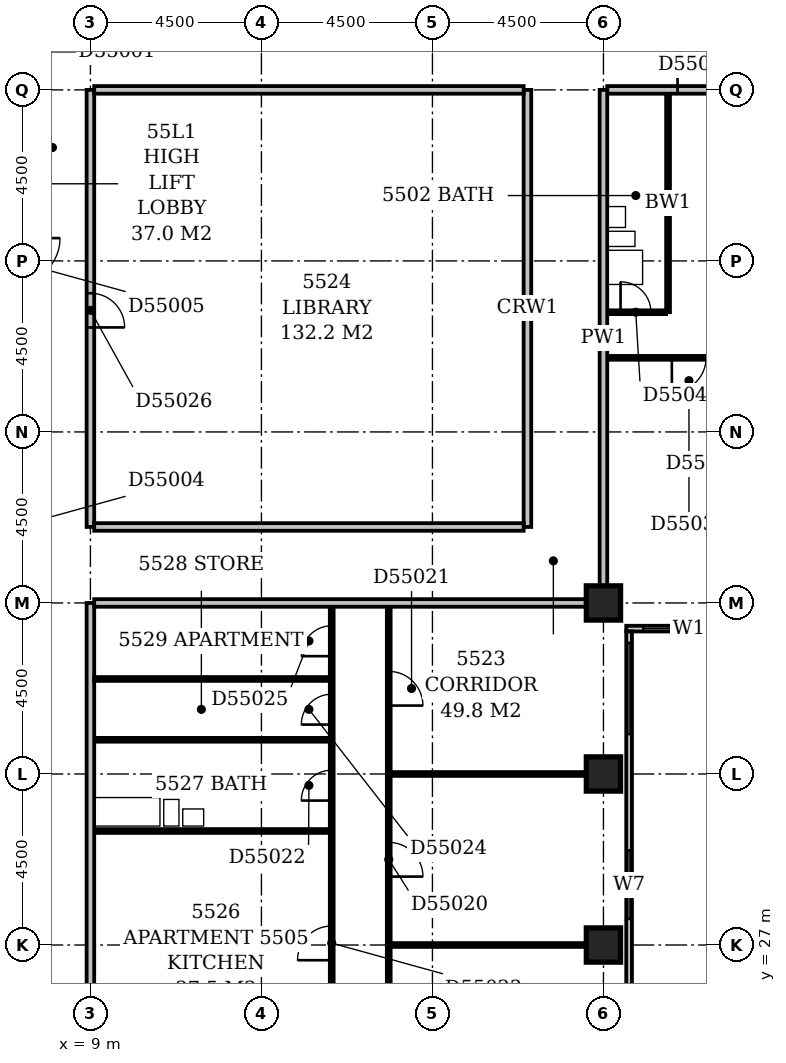
"""IFC4 building model, lengths in metres.
Left out: names, types, materials, properties, quantities, classifications, styles, units other than length and angle.
Written with IfcOpenShell. Run it as: python <this file> out.ifc"""

import sys

from ifc_helpers import new_model, si_unit, direction, frame, frame_2d, origin, origin_2d, place, context, subcontext, project, spatial, rectangle, extrude, element, fill, save


model = new_model("IFC4")
c1 = context("Model", 3, precision=1e-05, world=origin(), true_north=direction((0.0, 1.0)))
c2 = subcontext(c1, "Body", "Model", "MODEL_VIEW")
j1 = project(units=[si_unit("LENGTHUNIT", "METRE"), si_unit("PLANEANGLEUNIT", "RADIAN")], contexts=[c1])
p1 = place(None, origin())
s1 = spatial("IfcSite", under=j1, at=p1, CompositionType="ELEMENT")
p2 = place(p1, origin())
s2 = spatial("IfcBuilding", under=s1, at=p2, CompositionType="ELEMENT")
p3 = place(p2, frame((0.0, 0.0, 215.0)))
s3 = spatial("IfcBuildingStorey", under=s2, at=p3, CompositionType="ELEMENT", Elevation=215.0)
for number, where, z_axis, x_axis in (
    (1, (22.5, 27.0, -0.3), (0.0, 0.0, 1.0), (1.0, 0.0, 0.0)),
    (2, (22.5, 31.5, -0.3), (0.0, 0.0, 1.0), (1.0, 0.0, 0.0)),
    (3, (22.5, 36.0, -0.3), (0.0, 0.0, 1.0), (1.0, 0.0, 0.0)),
):
    element("IfcColumn", number, at=place(p3, frame(where, z_axis=z_axis, x_axis=x_axis)), inside=s3, PredefinedType="COLUMN", context=c2, shape_type="SweptSolid", body=[
        extrude(rectangle(XDim=0.9, YDim=0.9, at=origin_2d()), origin(), (0.0, 0.0, 1.0), 3.6),
    ])
p4 = place(p3, frame((23.175, 17.4, 0.0), z_axis=(0.0, 0.0, 1.0), x_axis=(0.0, 1.0, 0.0)))
e4 = element("IfcWall", 4, at=p4, inside=s3, PredefinedType="STANDARD", context=c2, shape_type="SweptSolid", body=[
    extrude(rectangle(XDim=17.85, YDim=0.15, at=frame_2d((8.925, 0.0))), origin(), (0.0, 0.0, 1.0), 2.7),
])
p5 = place(p4, frame((1.65, 0.0, 0.6)))
e5 = element("IfcOpeningElement", 5, at=p5, cuts=e4, PredefinedType="OPENING", context=c2, shape_type="SweptSolid", body=[
    extrude(rectangle(XDim=2.4, YDim=1.8, at=frame_2d((1.2, 0.9))), frame((0.0, 0.087, 0.0), z_axis=(0.0, -1.0, 0.0), x_axis=(1.0, 0.0, 0.0)), (0.0, 0.0, 1.0), 0.174),
])
p6 = place(p4, frame((6.15, 0.0, 0.6)))
e6 = element("IfcOpeningElement", 6, at=p6, cuts=e4, PredefinedType="OPENING", context=c2, shape_type="SweptSolid", body=[
    extrude(rectangle(XDim=2.4, YDim=1.8, at=frame_2d((1.2, 0.9))), frame((0.0, 0.087, 0.0), z_axis=(0.0, -1.0, 0.0), x_axis=(1.0, 0.0, 0.0)), (0.0, 0.0, 1.0), 0.174),
])
p7 = place(p4, frame((10.288, 0.0, 0.6)))
e7 = element("IfcOpeningElement", 7, at=p7, cuts=e4, PredefinedType="OPENING", context=c2, shape_type="SweptSolid", body=[
    extrude(rectangle(XDim=1.8, YDim=1.8, at=frame_2d((0.9, 0.9))), frame((0.0, 0.087, 0.0), z_axis=(0.0, -1.0, 0.0), x_axis=(1.0, 0.0, 0.0)), (0.0, 0.0, 1.0), 0.174),
])
p8 = place(p4, frame((15.15, 0.0, 0.6)))
e8 = element("IfcOpeningElement", 8, at=p8, cuts=e4, PredefinedType="OPENING", context=c2, shape_type="SweptSolid", body=[
    extrude(rectangle(XDim=2.4, YDim=1.8, at=frame_2d((1.2, 0.9))), frame((0.0, 0.087, 0.0), z_axis=(0.0, -1.0, 0.0), x_axis=(1.0, 0.0, 0.0)), (0.0, 0.0, 1.0), 0.174),
])
p9 = place(p3, frame((23.1, 35.325, 0.0), z_axis=(0.0, 0.0, 1.0), x_axis=(1.0, 0.0, 0.0)))
e9 = element("IfcWall", 9, at=p9, inside=s3, PredefinedType="STANDARD", context=c2, shape_type="SweptSolid", body=[
    extrude(rectangle(XDim=27.15, YDim=0.15, at=frame_2d((13.575, 0.0))), origin(), (0.0, 0.0, 1.0), 2.7),
])
p10 = place(p9, frame((0.45, 0.0, 0.6)))
e10 = element("IfcOpeningElement", 10, at=p10, cuts=e9, PredefinedType="OPENING", context=c2, shape_type="SweptSolid", body=[
    extrude(rectangle(XDim=2.4, YDim=1.8, at=frame_2d((1.2, 0.9))), frame((0.0, 0.087, 0.0), z_axis=(0.0, -1.0, 0.0), x_axis=(1.0, 0.0, 0.0)), (0.0, 0.0, 1.0), 0.174),
])
p11 = place(p9, frame((4.95, 0.0, 0.6)))
e11 = element("IfcOpeningElement", 11, at=p11, cuts=e9, PredefinedType="OPENING", context=c2, shape_type="SweptSolid", body=[
    extrude(rectangle(XDim=2.4, YDim=1.8, at=frame_2d((1.2, 0.9))), frame((0.0, 0.087, 0.0), z_axis=(0.0, -1.0, 0.0), x_axis=(1.0, 0.0, 0.0)), (0.0, 0.0, 1.0), 0.174),
])
p12 = place(p9, frame((10.424, 0.0, 0.6)))
e12 = element("IfcOpeningElement", 12, at=p12, cuts=e9, PredefinedType="OPENING", context=c2, shape_type="SweptSolid", body=[
    extrude(rectangle(XDim=1.8, YDim=1.8, at=frame_2d((0.9, 0.9))), frame((0.0, 0.087, 0.0), z_axis=(0.0, -1.0, 0.0), x_axis=(1.0, 0.0, 0.0)), (0.0, 0.0, 1.0), 0.174),
])
p13 = place(p9, frame((13.68, 0.0, 0.6)))
e13 = element("IfcOpeningElement", 13, at=p13, cuts=e9, PredefinedType="OPENING", context=c2, shape_type="SweptSolid", body=[
    extrude(rectangle(XDim=1.8, YDim=1.8, at=frame_2d((0.9, 0.9))), frame((0.0, 0.087, 0.0), z_axis=(0.0, -1.0, 0.0), x_axis=(1.0, 0.0, 0.0)), (0.0, 0.0, 1.0), 0.174),
])
p14 = place(p9, frame((18.45, 0.0, 0.6)))
e14 = element("IfcOpeningElement", 14, at=p14, cuts=e9, PredefinedType="OPENING", context=c2, shape_type="SweptSolid", body=[
    extrude(rectangle(XDim=2.4, YDim=1.8, at=frame_2d((1.2, 0.9))), frame((0.0, 0.087, 0.0), z_axis=(0.0, -1.0, 0.0), x_axis=(1.0, 0.0, 0.0)), (0.0, 0.0, 1.0), 0.174),
])
p15 = place(p9, frame((22.95, 0.0, 0.6)))
e15 = element("IfcOpeningElement", 15, at=p15, cuts=e9, PredefinedType="OPENING", context=c2, shape_type="SweptSolid", body=[
    extrude(rectangle(XDim=2.4, YDim=1.8, at=frame_2d((1.2, 0.9))), frame((0.0, 0.087, 0.0), z_axis=(0.0, -1.0, 0.0), x_axis=(1.0, 0.0, 0.0)), (0.0, 0.0, 1.0), 0.174),
])
p16 = place(p3, frame((9.0, 18.45, 0.0), z_axis=(0.0, 0.0, 1.0), x_axis=(0.0, 1.0, 0.0)))
e16 = element("IfcWall", 16, at=p16, inside=s3, PredefinedType="PARTITIONING", context=c2, shape_type="SweptSolid", body=[
    extrude(rectangle(XDim=17.55, YDim=0.2, at=frame_2d((8.775, 0.0))), origin(), (0.0, 0.0, 1.0), 3.3),
])
p17 = place(p16, frame((4.35, 0.0, 0.0)))
e17 = element("IfcOpeningElement", 17, at=p17, cuts=e16, PredefinedType="OPENING", context=c2, shape_type="SweptSolid", body=[
    extrude(rectangle(XDim=1.0, YDim=2.1, at=frame_2d((0.5, 1.05))), frame((0.0, 0.112, 0.0), z_axis=(0.0, -1.0, 0.0), x_axis=(1.0, 0.0, 0.0)), (0.0, 0.0, 1.0), 0.224),
])
p18 = place(p16, frame((2.8, 0.0, 0.0)))
e18 = element("IfcOpeningElement", 18, at=p18, cuts=e16, PredefinedType="OPENING", context=c2, shape_type="SweptSolid", body=[
    extrude(rectangle(XDim=1.0, YDim=2.1, at=frame_2d((0.5, 1.05))), frame((0.0, 0.112, 0.0), z_axis=(0.0, -1.0, 0.0), x_axis=(1.0, 0.0, 0.0)), (0.0, 0.0, 1.0), 0.224),
])
p19 = place(p3, frame((16.85, 22.6, 0.0), z_axis=(0.0, 0.0, 1.0), x_axis=(0.0, 1.0, 0.0)))
e19 = element("IfcWall", 19, at=p19, inside=s3, PredefinedType="PARTITIONING", context=c2, shape_type="SweptSolid", body=[
    extrude(rectangle(XDim=13.3, YDim=0.1, at=frame_2d((6.65, 0.0))), origin(), (0.0, 0.0, 1.0), 3.3),
])
p20 = place(p19, frame((1.7, 0.0, 0.0)))
e20 = element("IfcOpeningElement", 20, at=p20, cuts=e19, PredefinedType="OPENING", context=c2, shape_type="SweptSolid", body=[
    extrude(rectangle(XDim=0.9, YDim=2.1, at=frame_2d((0.45, 1.05))), frame((0.0, 0.062, 0.0), z_axis=(0.0, -1.0, 0.0), x_axis=(1.0, 0.0, 0.0)), (0.0, 0.0, 1.0), 0.124),
])
p21 = place(p19, frame((6.2, 0.0, 0.0)))
e21 = element("IfcOpeningElement", 21, at=p21, cuts=e19, PredefinedType="OPENING", context=c2, shape_type="SweptSolid", body=[
    extrude(rectangle(XDim=0.9, YDim=2.1, at=frame_2d((0.45, 1.05))), frame((0.0, 0.062, 0.0), z_axis=(0.0, -1.0, 0.0), x_axis=(1.0, 0.0, 0.0)), (0.0, 0.0, 1.0), 0.124),
])
p22 = place(p19, frame((10.7, 0.0, 0.0)))
e22 = element("IfcOpeningElement", 22, at=p22, cuts=e19, PredefinedType="OPENING", context=c2, shape_type="SweptSolid", body=[
    extrude(rectangle(XDim=0.9, YDim=2.1, at=frame_2d((0.45, 1.05))), frame((0.0, 0.062, 0.0), z_axis=(0.0, -1.0, 0.0), x_axis=(1.0, 0.0, 0.0)), (0.0, 0.0, 1.0), 0.124),
])
p23 = place(p3, frame((15.35, 24.1, 0.0), z_axis=(0.0, 0.0, 1.0), x_axis=(0.0, 1.0, 0.0)))
e23 = element("IfcWall", 23, at=p23, inside=s3, PredefinedType="PARTITIONING", context=c2, shape_type="SweptSolid", body=[
    extrude(rectangle(XDim=11.8, YDim=0.1, at=frame_2d((5.9, 0.0))), origin(), (0.0, 0.0, 1.0), 3.3),
])
p24 = place(p23, frame((6.7, 0.0, 0.0)))
e24 = element("IfcOpeningElement", 24, at=p24, cuts=e23, PredefinedType="OPENING", context=c2, shape_type="SweptSolid", body=[
    extrude(rectangle(XDim=0.8, YDim=2.1, at=frame_2d((0.4, 1.05))), frame((0.0, 0.062, 0.0), z_axis=(0.0, -1.0, 0.0), x_axis=(1.0, 0.0, 0.0)), (0.0, 0.0, 1.0), 0.124),
])
p25 = place(p23, frame((2.5, 0.0, 0.0)))
e25 = element("IfcOpeningElement", 25, at=p25, cuts=e23, PredefinedType="OPENING", context=c2, shape_type="SweptSolid", body=[
    extrude(rectangle(XDim=0.9, YDim=2.1, at=frame_2d((0.45, 1.05))), frame((0.0, 0.062, 0.0), z_axis=(0.0, -1.0, 0.0), x_axis=(1.0, 0.0, 0.0)), (0.0, 0.0, 1.0), 0.124),
])
p26 = place(p23, frame((8.7, 0.0, 0.0)))
e26 = element("IfcOpeningElement", 26, at=p26, cuts=e23, PredefinedType="OPENING", context=c2, shape_type="SweptSolid", body=[
    extrude(rectangle(XDim=0.8, YDim=2.1, at=frame_2d((0.4, 1.05))), frame((0.0, 0.062, 0.0), z_axis=(0.0, -1.0, 0.0), x_axis=(1.0, 0.0, 0.0)), (0.0, 0.0, 1.0), 0.124),
])
p27 = place(p23, frame((10.5, 0.0, 0.0)))
e27 = element("IfcOpeningElement", 27, at=p27, cuts=e23, PredefinedType="OPENING", context=c2, shape_type="SweptSolid", body=[
    extrude(rectangle(XDim=0.8, YDim=2.1, at=frame_2d((0.4, 1.05))), frame((0.0, 0.062, 0.0), z_axis=(0.0, -1.0, 0.0), x_axis=(1.0, 0.0, 0.0)), (0.0, 0.0, 1.0), 0.124),
])
p28 = place(p3, frame((16.9, 27.0, 0.0), z_axis=(0.0, 0.0, 1.0), x_axis=(1.0, 0.0, 0.0)))
e28 = element("IfcWall", 28, at=p28, inside=s3, PredefinedType="PARTITIONING", context=c2, shape_type="SweptSolid", body=[
    extrude(rectangle(XDim=5.15, YDim=0.1, at=frame_2d((2.575, 0.0))), origin(), (0.0, 0.0, 1.0), 2.7),
])
p29 = place(p3, frame((9.1, 30.0, 0.0), z_axis=(0.0, 0.0, 1.0), x_axis=(1.0, 0.0, 0.0)))
e29 = element("IfcWall", 29, at=p29, inside=s3, PredefinedType="PLUMBINGWALL", context=c2, shape_type="SweptSolid", body=[
    extrude(rectangle(XDim=6.2, YDim=0.1, at=frame_2d((3.1, 0.0))), origin(), (0.0, 0.0, 1.0), 3.3),
])
p30 = place(p3, frame((16.9, 31.5, 0.0), z_axis=(0.0, 0.0, 1.0), x_axis=(1.0, 0.0, 0.0)))
e30 = element("IfcWall", 30, at=p30, inside=s3, PredefinedType="PARTITIONING", context=c2, shape_type="SweptSolid", body=[
    extrude(rectangle(XDim=5.15, YDim=0.1, at=frame_2d((2.575, 0.0))), origin(), (0.0, 0.0, 1.0), 3.3),
])
p31 = place(p3, frame((9.1, 32.4, 0.0), z_axis=(0.0, 0.0, 1.0), x_axis=(1.0, 0.0, 0.0)))
e31 = element("IfcWall", 31, at=p31, inside=s3, PredefinedType="PLUMBINGWALL", context=c2, shape_type="SweptSolid", body=[
    extrude(rectangle(XDim=6.2, YDim=0.1, at=frame_2d((3.1, 0.0))), origin(), (0.0, 0.0, 1.0), 3.3),
])
p32 = place(p3, frame((9.1, 34.0, 0.0), z_axis=(0.0, 0.0, 1.0), x_axis=(1.0, 0.0, 0.0)))
e32 = element("IfcWall", 32, at=p32, inside=s3, PredefinedType="PARTITIONING", context=c2, shape_type="SweptSolid", body=[
    extrude(rectangle(XDim=6.2, YDim=0.1, at=frame_2d((3.1, 0.0))), origin(), (0.0, 0.0, 1.0), 3.3),
])
p33 = place(p3, frame((9.1, 36.0, 0.0), z_axis=(0.0, 0.0, 1.0), x_axis=(1.0, 0.0, 0.0)))
e33 = element("IfcWall", 33, at=p33, inside=s3, PredefinedType="PARTITIONING", context=c2, shape_type="SweptSolid", body=[
    extrude(rectangle(XDim=12.95, YDim=0.2, at=frame_2d((6.475, 0.0))), origin(), (0.0, 0.0, 1.0), 3.3),
])
p34 = place(p3, frame((22.5, 36.45, 0.0), z_axis=(0.0, 0.0, 1.0), x_axis=(0.0, 1.0, 0.0)))
e34 = element("IfcWall", 34, at=p34, inside=s3, PredefinedType="PARTITIONING", context=c2, shape_type="SweptSolid", body=[
    extrude(rectangle(XDim=13.05, YDim=0.2, at=frame_2d((6.525, 0.0))), origin(), (0.0, 0.0, 1.0), 3.3),
])
p35 = place(p3, frame((9.0, 38.0, 0.0), z_axis=(0.0, 0.0, 1.0), x_axis=(0.0, 1.0, 0.0)))
e35 = element("IfcWall", 35, at=p35, inside=s3, PredefinedType="PARTITIONING", context=c2, shape_type="SweptSolid", body=[
    extrude(rectangle(XDim=11.5, YDim=0.2, at=frame_2d((5.75, 0.0))), origin(), (0.0, 0.0, 1.0), 3.3),
])
p36 = place(p35, frame((5.25, 0.0, 0.0)))
e36 = element("IfcOpeningElement", 36, at=p36, cuts=e35, PredefinedType="OPENING", context=c2, shape_type="SweptSolid", body=[
    extrude(rectangle(XDim=0.9, YDim=2.1, at=frame_2d((0.45, 1.05))), frame((0.0, 0.112, 0.0), z_axis=(0.0, -1.0, 0.0), x_axis=(1.0, 0.0, 0.0)), (0.0, 0.0, 1.0), 0.224),
])
p37 = place(p3, frame((9.1, 38.0, 0.0), z_axis=(0.0, 0.0, 1.0), x_axis=(1.0, 0.0, 0.0)))
e37 = element("IfcWall", 37, at=p37, inside=s3, PredefinedType="PARTITIONING", context=c2, shape_type="SweptSolid", body=[
    extrude(rectangle(XDim=11.3, YDim=0.2, at=frame_2d((5.65, 0.0))), origin(), (0.0, 0.0, 1.0), 3.3),
])
p38 = place(p3, frame((20.5, 38.0, 0.0), z_axis=(0.0, 0.0, 1.0), x_axis=(0.0, 1.0, 0.0)))
e38 = element("IfcWall", 38, at=p38, inside=s3, PredefinedType="PARTITIONING", context=c2, shape_type="SweptSolid", body=[
    extrude(rectangle(XDim=11.5, YDim=0.2, at=frame_2d((5.75, 0.0))), origin(), (0.0, 0.0, 1.0), 3.3),
])
p39 = place(p3, frame((22.6, 42.45, 0.0), z_axis=(0.0, 0.0, 1.0), x_axis=(1.0, 0.0, 0.0)))
e39 = element("IfcWall", 39, at=p39, inside=s3, PredefinedType="PARTITIONING", context=c2, shape_type="SweptSolid", body=[
    extrude(rectangle(XDim=4.3, YDim=0.1, at=frame_2d((2.15, 0.0))), origin(), (0.0, 0.0, 1.0), 3.3),
])
p40 = place(p39, frame((1.7, 0.0, 0.0)))
e40 = element("IfcOpeningElement", 40, at=p40, cuts=e39, PredefinedType="OPENING", context=c2, shape_type="SweptSolid", body=[
    extrude(rectangle(XDim=0.9, YDim=2.1, at=frame_2d((0.45, 1.05))), frame((0.0, 0.062, 0.0), z_axis=(0.0, -1.0, 0.0), x_axis=(1.0, 0.0, 0.0)), (0.0, 0.0, 1.0), 0.124),
])
p41 = place(p3, frame((22.6, 43.65, 0.0), z_axis=(0.0, 0.0, 1.0), x_axis=(1.0, 0.0, 0.0)))
e41 = element("IfcWall", 41, at=p41, inside=s3, PredefinedType="PARTITIONING", context=c2, shape_type="SweptSolid", body=[
    extrude(rectangle(XDim=1.55, YDim=0.1, at=frame_2d((0.775, 0.0))), origin(), (0.0, 0.0, 1.0), 3.3),
])
p42 = place(p41, frame((0.35, 0.0, 0.0)))
e42 = element("IfcOpeningElement", 42, at=p42, cuts=e41, PredefinedType="OPENING", context=c2, shape_type="SweptSolid", body=[
    extrude(rectangle(XDim=0.8, YDim=2.1, at=frame_2d((0.4, 1.05))), frame((0.0, 0.062, 0.0), z_axis=(0.0, -1.0, 0.0), x_axis=(1.0, 0.0, 0.0)), (0.0, 0.0, 1.0), 0.124),
])
p43 = place(p3, frame((24.2, 43.65, 0.0), z_axis=(0.0, 0.0, 1.0), x_axis=(0.0, 1.0, 0.0)))
e43 = element("IfcWall", 43, at=p43, inside=s3, PredefinedType="PLUMBINGWALL", context=c2, shape_type="SweptSolid", body=[
    extrude(rectangle(XDim=5.75, YDim=0.1, at=frame_2d((2.875, 0.0))), origin(), (0.0, 0.0, 1.0), 3.3),
])
p44 = place(p3, frame((9.1, 49.5, 0.0), z_axis=(0.0, 0.0, 1.0), x_axis=(1.0, 0.0, 0.0)))
e44 = element("IfcWall", 44, at=p44, inside=s3, PredefinedType="PARTITIONING", context=c2, shape_type="SweptSolid", body=[
    extrude(rectangle(XDim=11.3, YDim=0.2, at=frame_2d((5.65, 0.0))), origin(), (0.0, 0.0, 1.0), 3.3),
])
p45 = place(p3, frame((22.6, 49.5, 0.0), z_axis=(0.0, 0.0, 1.0), x_axis=(1.0, 0.0, 0.0)))
e45 = element("IfcWall", 45, at=p45, inside=s3, PredefinedType="PARTITIONING", context=c2, shape_type="SweptSolid", body=[
    extrude(rectangle(XDim=30.95, YDim=0.2, at=frame_2d((15.475, 0.0))), origin(), (0.0, 0.0, 1.0), 3.3),
])
p46 = place(p45, frame((1.85, 0.0, 0.0)))
e46 = element("IfcOpeningElement", 46, at=p46, cuts=e45, PredefinedType="OPENING", context=c2, shape_type="SweptSolid", body=[
    extrude(rectangle(XDim=1.0, YDim=2.1, at=frame_2d((0.5, 1.05))), frame((0.0, 0.112, 0.0), z_axis=(0.0, -1.0, 0.0), x_axis=(1.0, 0.0, 0.0)), (0.0, 0.0, 1.0), 0.224),
])
p47 = place(p45, frame((4.7, 0.0, 0.0)))
e47 = element("IfcOpeningElement", 47, at=p47, cuts=e45, PredefinedType="OPENING", context=c2, shape_type="SweptSolid", body=[
    extrude(rectangle(XDim=1.0, YDim=2.1, at=frame_2d((0.5, 1.05))), frame((0.0, 0.112, 0.0), z_axis=(0.0, -1.0, 0.0), x_axis=(1.0, 0.0, 0.0)), (0.0, 0.0, 1.0), 0.224),
])
p48 = place(p45, frame((18.2, 0.0, 0.0)))
e48 = element("IfcOpeningElement", 48, at=p48, cuts=e45, PredefinedType="OPENING", context=c2, shape_type="SweptSolid", body=[
    extrude(rectangle(XDim=1.0, YDim=2.1, at=frame_2d((0.5, 1.05))), frame((0.0, 0.112, 0.0), z_axis=(0.0, -1.0, 0.0), x_axis=(1.0, 0.0, 0.0)), (0.0, 0.0, 1.0), 0.224),
])
p49 = place(p45, frame((27.15, 0.0, 0.0)))
e49 = element("IfcOpeningElement", 49, at=p49, cuts=e45, PredefinedType="OPENING", context=c2, shape_type="SweptSolid", body=[
    extrude(rectangle(XDim=1.0, YDim=2.1, at=frame_2d((0.5, 1.05))), frame((0.0, 0.112, 0.0), z_axis=(0.0, -1.0, 0.0), x_axis=(1.0, 0.0, 0.0)), (0.0, 0.0, 1.0), 0.224),
])
p50 = place(p7, origin())
e50 = element("IfcWindow", 50, at=p50, inside=s3, PartitioningType="SINGLE_PANEL", PredefinedType="WINDOW", context=c2, shape_type="SweptSolid", body=[
    extrude(rectangle(XDim=1.8, YDim=1.8, at=frame_2d((0.9, 0.9))), frame((0.0, 0.03, 0.0), z_axis=(0.0, -1.0, 0.0), x_axis=(1.0, 0.0, 0.0)), (0.0, 0.0, 1.0), 0.06),
])
fill(e7, e50)
p51 = place(p8, origin())
e51 = element("IfcWindow", 51, at=p51, inside=s3, PartitioningType="SINGLE_PANEL", PredefinedType="WINDOW", context=c2, shape_type="SweptSolid", body=[
    extrude(rectangle(XDim=2.4, YDim=1.8, at=frame_2d((1.2, 0.9))), frame((0.0, 0.03, 0.0), z_axis=(0.0, -1.0, 0.0), x_axis=(1.0, 0.0, 0.0)), (0.0, 0.0, 1.0), 0.06),
])
fill(e8, e51)
p52 = place(p10, origin())
e52 = element("IfcWindow", 52, at=p52, inside=s3, PartitioningType="SINGLE_PANEL", PredefinedType="WINDOW", context=c2, shape_type="SweptSolid", body=[
    extrude(rectangle(XDim=2.4, YDim=1.8, at=frame_2d((1.2, 0.9))), frame((0.0, 0.03, 0.0), z_axis=(0.0, -1.0, 0.0), x_axis=(1.0, 0.0, 0.0)), (0.0, 0.0, 1.0), 0.06),
])
fill(e10, e52)
p53 = place(p21, frame((0.9, 0.0, 0.0), z_axis=(0.0, 0.0, 1.0), x_axis=(-1.0, 0.0, 0.0)))
e53 = element("IfcDoor", 53, at=p53, inside=s3, OperationType="SINGLE_SWING_RIGHT", PredefinedType="DOOR", context=c2, shape_type="SweptSolid", body=[
    extrude(rectangle(XDim=0.9, YDim=2.1, at=frame_2d((0.45, 1.05))), frame((0.0, 0.025, 0.0), z_axis=(0.0, -1.0, 0.0), x_axis=(1.0, 0.0, 0.0)), (0.0, 0.0, 1.0), 0.05),
])
fill(e21, e53)
p54 = place(p22, frame((0.9, 0.0, 0.0), z_axis=(0.0, 0.0, 1.0), x_axis=(-1.0, 0.0, 0.0)))
e54 = element("IfcDoor", 54, at=p54, inside=s3, OperationType="SINGLE_SWING_RIGHT", PredefinedType="DOOR", context=c2, shape_type="SweptSolid", body=[
    extrude(rectangle(XDim=0.9, YDim=2.1, at=frame_2d((0.45, 1.05))), frame((0.0, 0.025, 0.0), z_axis=(0.0, -1.0, 0.0), x_axis=(1.0, 0.0, 0.0)), (0.0, 0.0, 1.0), 0.05),
])
fill(e22, e54)
p55 = place(p24, origin())
e55 = element("IfcDoor", 55, at=p55, inside=s3, OperationType="SINGLE_SWING_LEFT", PredefinedType="DOOR", context=c2, shape_type="SweptSolid", body=[
    extrude(rectangle(XDim=0.8, YDim=2.1, at=frame_2d((0.4, 1.05))), frame((0.0, 0.025, 0.0), z_axis=(0.0, -1.0, 0.0), x_axis=(1.0, 0.0, 0.0)), (0.0, 0.0, 1.0), 0.05),
])
fill(e24, e55)
p56 = place(p25, origin())
e56 = element("IfcDoor", 56, at=p56, inside=s3, OperationType="SINGLE_SWING_LEFT", PredefinedType="DOOR", context=c2, shape_type="SweptSolid", body=[
    extrude(rectangle(XDim=0.9, YDim=2.1, at=frame_2d((0.45, 1.05))), frame((0.0, 0.025, 0.0), z_axis=(0.0, -1.0, 0.0), x_axis=(1.0, 0.0, 0.0)), (0.0, 0.0, 1.0), 0.05),
])
fill(e25, e56)
p57 = place(p26, origin())
e57 = element("IfcDoor", 57, at=p57, inside=s3, OperationType="SINGLE_SWING_LEFT", PredefinedType="DOOR", context=c2, shape_type="SweptSolid", body=[
    extrude(rectangle(XDim=0.8, YDim=2.1, at=frame_2d((0.4, 1.05))), frame((0.0, 0.025, 0.0), z_axis=(0.0, -1.0, 0.0), x_axis=(1.0, 0.0, 0.0)), (0.0, 0.0, 1.0), 0.05),
])
fill(e26, e57)
p58 = place(p27, origin())
e58 = element("IfcDoor", 58, at=p58, inside=s3, OperationType="SINGLE_SWING_LEFT", PredefinedType="DOOR", context=c2, shape_type="SweptSolid", body=[
    extrude(rectangle(XDim=0.8, YDim=2.1, at=frame_2d((0.4, 1.05))), frame((0.0, 0.025, 0.0), z_axis=(0.0, -1.0, 0.0), x_axis=(1.0, 0.0, 0.0)), (0.0, 0.0, 1.0), 0.05),
])
fill(e27, e58)
p59 = place(p36, frame((0.9, 0.0, 0.0), z_axis=(0.0, 0.0, 1.0), x_axis=(-1.0, 0.0, 0.0)))
e59 = element("IfcDoor", 59, at=p59, inside=s3, OperationType="SINGLE_SWING_RIGHT", PredefinedType="DOOR", context=c2, shape_type="SweptSolid", body=[
    extrude(rectangle(XDim=0.9, YDim=2.1, at=frame_2d((0.45, 1.05))), frame((0.0, 0.025, 0.0), z_axis=(0.0, -1.0, 0.0), x_axis=(1.0, 0.0, 0.0)), (0.0, 0.0, 1.0), 0.05),
])
fill(e36, e59)
p60 = place(p40, frame((0.9, 0.0, 0.0), z_axis=(0.0, 0.0, 1.0), x_axis=(-1.0, 0.0, 0.0)))
e60 = element("IfcDoor", 60, at=p60, inside=s3, OperationType="SINGLE_SWING_RIGHT", PredefinedType="DOOR", context=c2, shape_type="SweptSolid", body=[
    extrude(rectangle(XDim=0.9, YDim=2.1, at=frame_2d((0.45, 1.05))), frame((0.0, 0.025, 0.0), z_axis=(0.0, -1.0, 0.0), x_axis=(1.0, 0.0, 0.0)), (0.0, 0.0, 1.0), 0.05),
])
fill(e40, e60)
p61 = place(p42, origin())
e61 = element("IfcDoor", 61, at=p61, inside=s3, OperationType="SINGLE_SWING_LEFT", PredefinedType="DOOR", context=c2, shape_type="SweptSolid", body=[
    extrude(rectangle(XDim=0.8, YDim=2.1, at=frame_2d((0.4, 1.05))), frame((0.0, 0.025, 0.0), z_axis=(0.0, -1.0, 0.0), x_axis=(1.0, 0.0, 0.0)), (0.0, 0.0, 1.0), 0.05),
])
fill(e42, e61)
p62 = place(p46, origin())
e62 = element("IfcDoor", 62, at=p62, inside=s3, OperationType="SINGLE_SWING_LEFT", PredefinedType="DOOR", context=c2, shape_type="SweptSolid", body=[
    extrude(rectangle(XDim=1.0, YDim=2.1, at=frame_2d((0.5, 1.05))), frame((0.0, 0.025, 0.0), z_axis=(0.0, -1.0, 0.0), x_axis=(1.0, 0.0, 0.0)), (0.0, 0.0, 1.0), 0.05),
])
fill(e46, e62)
save(model, sys.argv[1])
